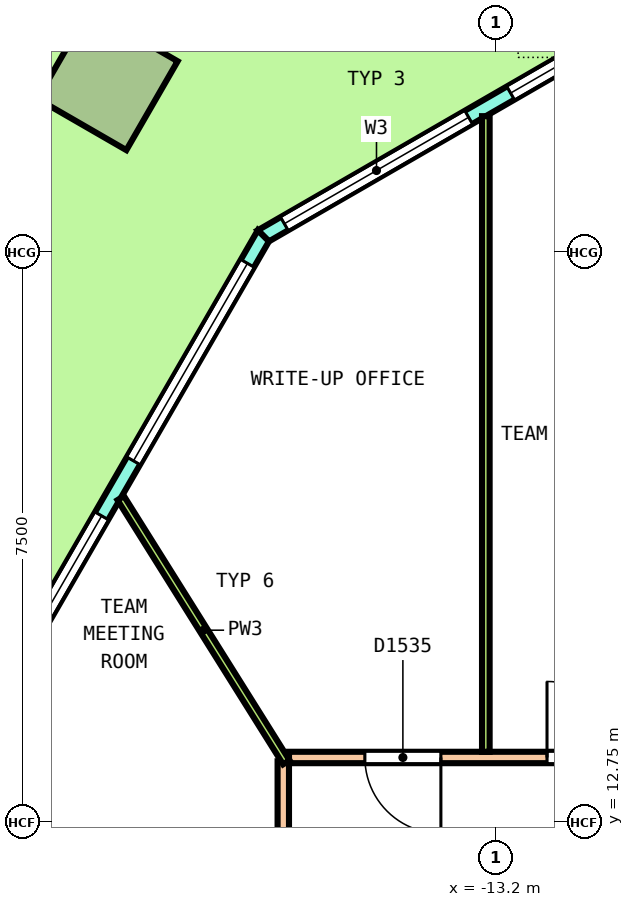
"""IFC4 building model, lengths in metres.
Left out: names, types, materials, properties, quantities, classifications, styles, units other than length and angle.
Written with IfcOpenShell. Run it as: python <this file> out.ifc"""

import sys

from ifc_helpers import new_model, si_unit, direction, frame, frame_2d, origin, origin_2d, place, context, subcontext, project, spatial, polyline, rectangle, outline, extrude, element, fill, save


model = new_model("IFC4")
c1 = context("Model", 3, precision=1e-05, world=origin(), true_north=direction((0.0, 1.0)))
c2 = subcontext(c1, "Body", "Model", "MODEL_VIEW")
j1 = project(units=[si_unit("LENGTHUNIT", "METRE"), si_unit("PLANEANGLEUNIT", "RADIAN")], contexts=[c1])
p1 = place(None, origin())
s1 = spatial("IfcSite", under=j1, at=p1, CompositionType="ELEMENT")
p2 = place(p1, origin())
s2 = spatial("IfcBuilding", under=s1, at=p2, CompositionType="ELEMENT")
p3 = place(p2, frame((0.0, 0.0, 94.0)))
s3 = spatial("IfcBuildingStorey", under=s2, at=p3, CompositionType="ELEMENT", Elevation=94.0)
p4 = place(p3, frame((-18.312, 22.512, 0.0), z_axis=(-0.036265236264, 0.0, 0.999342199969), x_axis=(-0.499424867419, -0.866167613071, -0.018123682572)))
e1 = element("IfcColumn", 1, at=p4, inside=s3, PredefinedType="COLUMN", context=c2, shape_type="SweptSolid", body=[
    extrude(rectangle(XDim=1.35, YDim=1.35, at=origin_2d()), origin(), (0.0, 0.0, 1.0), 4.053),
])
p5 = place(p3, frame((-10.309, 23.9, 0.0), z_axis=(0.0, 0.0, 1.0), x_axis=(-0.866029458321, -0.49999297727, 0.0)))
e2 = element("IfcWall", 2, at=p5, inside=s3, PredefinedType="SOLIDWALL", context=c2, shape_type="SweptSolid", body=[
    extrude(outline(polyline([(-0.027, -0.1), (1.128, -0.1), (2.282, -0.1), (3.437, -0.1), (4.592, -0.1), (5.747, -0.1), (6.901, -0.1), (6.848, 0.1), (5.711, 0.1), (4.574, 0.1), (3.437, 0.1), (2.301, 0.1), (1.164, 0.1), (0.027, 0.1), (-0.027, -0.1)])), origin(), (0.0, 0.0, 1.0), 4.1),
])
p6 = place(p5, frame((0.319, 0.0, 0.1)))
e3 = element("IfcOpeningElement", 3, at=p6, cuts=e2, PredefinedType="OPENING", context=c2, shape_type="SweptSolid", body=[
    extrude(rectangle(XDim=2.8, YDim=2.9, at=frame_2d((1.4, 1.45))), frame((0.0, 0.11, 0.0), z_axis=(0.0, -1.0, 0.0), x_axis=(1.0, 0.0, 0.0)), (0.0, 0.0, 1.0), 0.22),
])
p7 = place(p5, frame((3.756, 0.0, 0.1)))
e4 = element("IfcOpeningElement", 4, at=p7, cuts=e2, PredefinedType="OPENING", context=c2, shape_type="SweptSolid", body=[
    extrude(rectangle(XDim=2.8, YDim=2.9, at=frame_2d((1.4, 1.45))), frame((0.0, 0.11, 0.0), z_axis=(0.0, -1.0, 0.0), x_axis=(1.0, 0.0, 0.0)), (0.0, 0.0, 1.0), 0.22),
])
p8 = place(p3, frame((-16.262, 20.463, 0.0), z_axis=(0.0, 0.0, 1.0), x_axis=(-0.499998279088, -0.866026397351, 0.0)))
e5 = element("IfcWall", 5, at=p8, inside=s3, PredefinedType="SOLIDWALL", context=c2, shape_type="SweptSolid", body=[
    extrude(outline(polyline([(-0.027, -0.1), (0.985, -0.1), (1.998, -0.1), (3.01, -0.1), (4.022, -0.1), (5.035, -0.1), (6.047, -0.1), (7.059, -0.1), (8.072, -0.1), (9.084, -0.1), (10.096, -0.1), (11.109, -0.1), (12.121, -0.1), (13.133, -0.1), (14.146, -0.1), (15.158, -0.1), (16.17, -0.1), (17.182, -0.1), (18.195, -0.1), (19.207, -0.1), (19.153, 0.1), (18.147, 0.1), (17.14, 0.1), (16.133, 0.1), (15.127, 0.1), (14.12, 0.1), (13.113, 0.1), (12.107, 0.1), (11.1, 0.1), (10.094, 0.1), (9.087, 0.1), (8.08, 0.1), (7.073, 0.1), (6.067, 0.1), (5.06, 0.1), (4.053, 0.1), (3.047, 0.1), (2.04, 0.1), (1.033, 0.1), (0.027, 0.1), (-0.027, -0.1)])), origin(), (0.0, 0.0, 1.0), 4.1),
])
p9 = place(p8, frame((0.418, 0.0, 0.1)))
e6 = element("IfcOpeningElement", 6, at=p9, cuts=e5, PredefinedType="OPENING", context=c2, shape_type="SweptSolid", body=[
    extrude(rectangle(XDim=3.0, YDim=2.9, at=frame_2d((1.5, 1.45))), frame((0.0, 0.11, 0.0), z_axis=(0.0, -1.0, 0.0), x_axis=(1.0, 0.0, 0.0)), (0.0, 0.0, 1.0), 0.22),
])
p10 = place(p8, frame((4.254, 0.0, 0.1)))
e7 = element("IfcOpeningElement", 7, at=p10, cuts=e5, PredefinedType="OPENING", context=c2, shape_type="SweptSolid", body=[
    extrude(rectangle(XDim=3.0, YDim=2.9, at=frame_2d((1.5, 1.45))), frame((0.0, 0.11, 0.0), z_axis=(0.0, -1.0, 0.0), x_axis=(1.0, 0.0, 0.0)), (0.0, 0.0, 1.0), 0.22),
])
p11 = place(p8, frame((8.69, 0.0, 0.0)))
e8 = element("IfcOpeningElement", 8, at=p11, cuts=e5, PredefinedType="OPENING", context=c2, shape_type="SweptSolid", body=[
    extrude(rectangle(XDim=1.8, YDim=2.4, at=frame_2d((0.9, 1.2))), frame((0.0, 0.11, 0.0), z_axis=(0.0, -1.0, 0.0), x_axis=(1.0, 0.0, 0.0)), (0.0, 0.0, 1.0), 0.22),
])
p12 = place(p8, frame((8.69, 0.0, 2.55)))
e9 = element("IfcOpeningElement", 9, at=p12, cuts=e5, PredefinedType="OPENING", context=c2, shape_type="SweptSolid", body=[
    extrude(rectangle(XDim=1.8, YDim=0.45, at=frame_2d((0.9, 0.225))), frame((0.0, 0.11, 0.0), z_axis=(0.0, -1.0, 0.0), x_axis=(1.0, 0.0, 0.0)), (0.0, 0.0, 1.0), 0.22),
])
p13 = place(p8, frame((11.926, 0.0, 0.1)))
e10 = element("IfcOpeningElement", 10, at=p13, cuts=e5, PredefinedType="OPENING", context=c2, shape_type="SweptSolid", body=[
    extrude(rectangle(XDim=3.0, YDim=2.9, at=frame_2d((1.5, 1.45))), frame((0.0, 0.11, 0.0), z_axis=(0.0, -1.0, 0.0), x_axis=(1.0, 0.0, 0.0)), (0.0, 0.0, 1.0), 0.22),
])
p14 = place(p8, frame((15.762, 0.0, 0.1)))
e11 = element("IfcOpeningElement", 11, at=p14, cuts=e5, PredefinedType="OPENING", context=c2, shape_type="SweptSolid", body=[
    extrude(rectangle(XDim=3.0, YDim=2.9, at=frame_2d((1.5, 1.45))), frame((0.0, 0.11, 0.0), z_axis=(0.0, -1.0, 0.0), x_axis=(1.0, 0.0, 0.0)), (0.0, 0.0, 1.0), 0.22),
])
p15 = place(p3, frame((-15.925, 13.6, 0.0), z_axis=(0.0, 0.0, 1.0), x_axis=(1.0, 0.0, 0.0)))
e12 = element("IfcWall", 12, at=p15, inside=s3, PredefinedType="PARTITIONING", context=c2, shape_type="SweptSolid", body=[
    extrude(rectangle(XDim=31.85, YDim=0.15, at=frame_2d((15.925, 0.0))), origin(), (0.0, 0.0, 1.0), 3.05),
])
p16 = place(p15, frame((30.334, 0.0, 0.0)))
e13 = element("IfcOpeningElement", 13, at=p16, cuts=e12, PredefinedType="OPENING", context=c2, shape_type="SweptSolid", body=[
    extrude(rectangle(XDim=1.0, YDim=2.1, at=frame_2d((0.5, 1.05))), frame((0.0, 0.085, 0.0), z_axis=(0.0, -1.0, 0.0), x_axis=(1.0, 0.0, 0.0)), (0.0, 0.0, 1.0), 0.17),
])
p17 = place(p15, frame((27.455, 0.0, 0.0)))
e14 = element("IfcOpeningElement", 14, at=p17, cuts=e12, PredefinedType="OPENING", context=c2, shape_type="SweptSolid", body=[
    extrude(rectangle(XDim=1.0, YDim=2.1, at=frame_2d((0.5, 1.05))), frame((0.0, 0.085, 0.0), z_axis=(0.0, -1.0, 0.0), x_axis=(1.0, 0.0, 0.0)), (0.0, 0.0, 1.0), 0.17),
])
p18 = place(p15, frame((16.833, 0.0, 0.0)))
e15 = element("IfcOpeningElement", 15, at=p18, cuts=e12, PredefinedType="OPENING", context=c2, shape_type="SweptSolid", body=[
    extrude(rectangle(XDim=1.2, YDim=2.1, at=frame_2d((0.6, 1.05))), frame((0.0, 0.085, 0.0), z_axis=(0.0, -1.0, 0.0), x_axis=(1.0, 0.0, 0.0)), (0.0, 0.0, 1.0), 0.17),
])
p19 = place(p15, frame((10.866, 0.0, 0.0)))
e16 = element("IfcOpeningElement", 16, at=p19, cuts=e12, PredefinedType="OPENING", context=c2, shape_type="SweptSolid", body=[
    extrude(rectangle(XDim=1.0, YDim=2.1, at=frame_2d((0.5, 1.05))), frame((0.0, 0.085, 0.0), z_axis=(0.0, -1.0, 0.0), x_axis=(1.0, 0.0, 0.0)), (0.0, 0.0, 1.0), 0.17),
])
p20 = place(p15, frame((3.395, 0.0, 0.0)))
e17 = element("IfcOpeningElement", 17, at=p20, cuts=e12, PredefinedType="OPENING", context=c2, shape_type="SweptSolid", body=[
    extrude(rectangle(XDim=1.0, YDim=2.1, at=frame_2d((0.5, 1.05))), frame((0.0, 0.085, 0.0), z_axis=(0.0, -1.0, 0.0), x_axis=(1.0, 0.0, 0.0)), (0.0, 0.0, 1.0), 0.17),
])
p21 = place(p15, frame((0.998, 0.0, 0.0)))
e18 = element("IfcOpeningElement", 18, at=p21, cuts=e12, PredefinedType="OPENING", context=c2, shape_type="SweptSolid", body=[
    extrude(rectangle(XDim=1.0, YDim=2.1, at=frame_2d((0.5, 1.05))), frame((0.0, 0.085, 0.0), z_axis=(0.0, -1.0, 0.0), x_axis=(1.0, 0.0, 0.0)), (0.0, 0.0, 1.0), 0.17),
])
p22 = place(p3, frame((-16.0, -13.525, 0.0), z_axis=(0.0, 0.0, 1.0), x_axis=(0.0, 1.0, 0.0)))
e19 = element("IfcWall", 19, at=p22, inside=s3, PredefinedType="PARTITIONING", context=c2, shape_type="SweptSolid", body=[
    extrude(rectangle(XDim=27.075, YDim=0.15, at=frame_2d((13.538, 0.0))), origin(), (0.0, 0.0, 1.0), 3.05),
])
p23 = place(p22, frame((24.756, 0.0, 0.0)))
e20 = element("IfcOpeningElement", 20, at=p23, cuts=e19, PredefinedType="OPENING", context=c2, shape_type="SweptSolid", body=[
    extrude(rectangle(XDim=1.0, YDim=2.1, at=frame_2d((0.5, 1.05))), frame((0.0, 0.085, 0.0), z_axis=(0.0, -1.0, 0.0), x_axis=(1.0, 0.0, 0.0)), (0.0, 0.0, 1.0), 0.17),
])
p24 = place(p22, frame((19.421, 0.0, 0.0)))
e21 = element("IfcOpeningElement", 21, at=p24, cuts=e19, PredefinedType="OPENING", context=c2, shape_type="SweptSolid", body=[
    extrude(rectangle(XDim=1.2, YDim=2.1, at=frame_2d((0.6, 1.05))), frame((0.0, 0.085, 0.0), z_axis=(0.0, -1.0, 0.0), x_axis=(1.0, 0.0, 0.0)), (0.0, 0.0, 1.0), 0.17),
])
p25 = place(p22, frame((14.597, 0.0, 0.0)))
e22 = element("IfcOpeningElement", 22, at=p25, cuts=e19, PredefinedType="OPENING", context=c2, shape_type="SweptSolid", body=[
    extrude(rectangle(XDim=1.2, YDim=2.1, at=frame_2d((0.6, 1.05))), frame((0.0, 0.085, 0.0), z_axis=(0.0, -1.0, 0.0), x_axis=(1.0, 0.0, 0.0)), (0.0, 0.0, 1.0), 0.17),
])
p26 = place(p22, frame((7.611, 0.0, 0.0)))
e23 = element("IfcOpeningElement", 23, at=p26, cuts=e19, PredefinedType="OPENING", context=c2, shape_type="SweptSolid", body=[
    extrude(rectangle(XDim=1.2, YDim=2.1, at=frame_2d((0.6, 1.05))), frame((0.0, 0.085, 0.0), z_axis=(0.0, -1.0, 0.0), x_axis=(1.0, 0.0, 0.0)), (0.0, 0.0, 1.0), 0.17),
])
p27 = place(p22, frame((1.374, 0.0, 0.0)))
e24 = element("IfcOpeningElement", 24, at=p27, cuts=e19, PredefinedType="OPENING", context=c2, shape_type="SweptSolid", body=[
    extrude(rectangle(XDim=1.0, YDim=2.1, at=frame_2d((0.5, 1.05))), frame((0.0, 0.085, 0.0), z_axis=(0.0, -1.0, 0.0), x_axis=(1.0, 0.0, 0.0)), (0.0, 0.0, 1.0), 0.17),
])
p28 = place(p3, frame((-13.335, 13.675, 0.0), z_axis=(0.0, 0.0, 1.0), x_axis=(0.0, 1.0, 0.0)))
e25 = element("IfcWall", 25, at=p28, inside=s3, PredefinedType="PARTITIONING", context=c2, shape_type="SweptSolid", body=[
    extrude(rectangle(XDim=8.362, YDim=0.1, at=frame_2d((4.181, 0.0))), origin(), (0.0, 0.0, 1.0), 3.05),
])
p29 = place(p3, frame((-18.139, 17.013, 0.0), z_axis=(0.0, 0.0, 1.0), x_axis=(0.531009568181, -0.847365823302, 0.0)))
e26 = element("IfcWall", 26, at=p29, inside=s3, PredefinedType="PARTITIONING", context=c2, shape_type="SweptSolid", body=[
    extrude(rectangle(XDim=4.103, YDim=0.1, at=frame_2d((2.051, 0.0))), origin(), (0.0, 0.0, 1.0), 3.05),
])
p30 = place(p6, origin())
e27 = element("IfcWindow", 27, at=p30, inside=s3, PartitioningType="SINGLE_PANEL", PredefinedType="WINDOW", context=c2, shape_type="SweptSolid", body=[
    extrude(rectangle(XDim=2.8, YDim=2.9, at=frame_2d((1.4, 1.45))), frame((0.0, 0.03, 0.0), z_axis=(0.0, -1.0, 0.0), x_axis=(1.0, 0.0, 0.0)), (0.0, 0.0, 1.0), 0.06),
])
fill(e3, e27)
p31 = place(p7, origin())
e28 = element("IfcWindow", 28, at=p31, inside=s3, PartitioningType="SINGLE_PANEL", PredefinedType="WINDOW", context=c2, shape_type="SweptSolid", body=[
    extrude(rectangle(XDim=2.8, YDim=2.9, at=frame_2d((1.4, 1.45))), frame((0.0, 0.03, 0.0), z_axis=(0.0, -1.0, 0.0), x_axis=(1.0, 0.0, 0.0)), (0.0, 0.0, 1.0), 0.06),
])
fill(e4, e28)
p32 = place(p9, origin())
e29 = element("IfcWindow", 29, at=p32, inside=s3, PartitioningType="SINGLE_PANEL", PredefinedType="WINDOW", context=c2, shape_type="SweptSolid", body=[
    extrude(rectangle(XDim=3.0, YDim=2.9, at=frame_2d((1.5, 1.45))), frame((0.0, 0.03, 0.0), z_axis=(0.0, -1.0, 0.0), x_axis=(1.0, 0.0, 0.0)), (0.0, 0.0, 1.0), 0.06),
])
fill(e6, e29)
p33 = place(p10, origin())
e30 = element("IfcWindow", 30, at=p33, inside=s3, PartitioningType="SINGLE_PANEL", PredefinedType="WINDOW", context=c2, shape_type="SweptSolid", body=[
    extrude(rectangle(XDim=3.0, YDim=2.9, at=frame_2d((1.5, 1.45))), frame((0.0, 0.03, 0.0), z_axis=(0.0, -1.0, 0.0), x_axis=(1.0, 0.0, 0.0)), (0.0, 0.0, 1.0), 0.06),
])
fill(e7, e30)
p34 = place(p20, origin())
e31 = element("IfcDoor", 31, at=p34, inside=s3, OperationType="SINGLE_SWING_LEFT", PredefinedType="DOOR", context=c2, shape_type="SweptSolid", body=[
    extrude(rectangle(XDim=1.0, YDim=2.1, at=frame_2d((0.5, 1.05))), frame((0.0, 0.025, 0.0), z_axis=(0.0, -1.0, 0.0), x_axis=(1.0, 0.0, 0.0)), (0.0, 0.0, 1.0), 0.05),
])
fill(e17, e31)
p35 = place(p21, origin())
e32 = element("IfcDoor", 32, at=p35, inside=s3, OperationType="SINGLE_SWING_LEFT", PredefinedType="DOOR", context=c2, shape_type="SweptSolid", body=[
    extrude(rectangle(XDim=1.0, YDim=2.1, at=frame_2d((0.5, 1.05))), frame((0.0, 0.025, 0.0), z_axis=(0.0, -1.0, 0.0), x_axis=(1.0, 0.0, 0.0)), (0.0, 0.0, 1.0), 0.05),
])
fill(e18, e32)
save(model, sys.argv[1])
